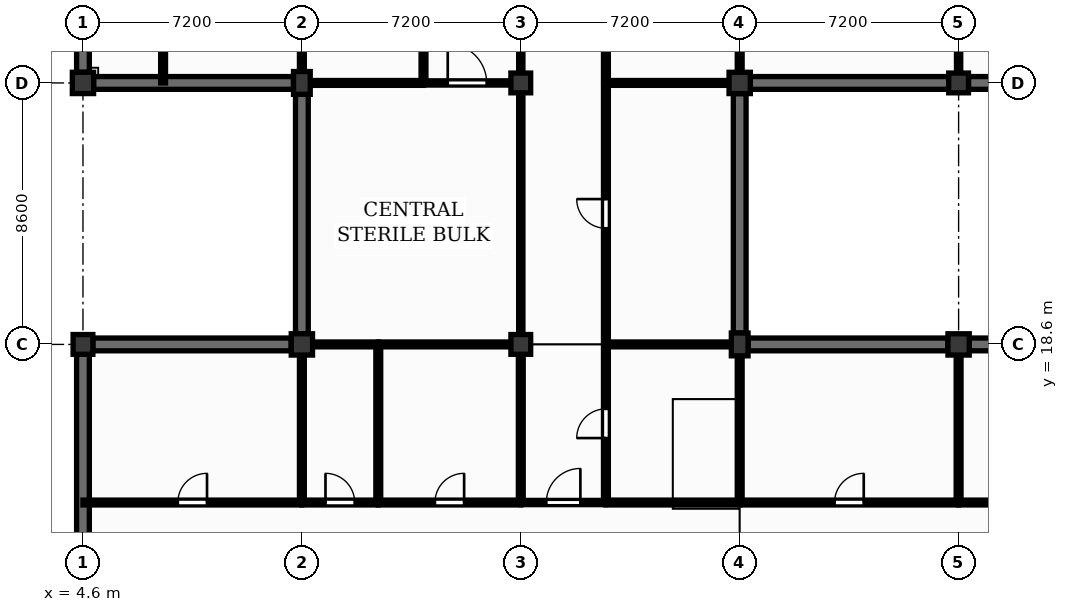
"""IFC4 building model, lengths in metres.
Left out: names, types, materials, properties, quantities, classifications, styles, units other than length and angle.
Written with IfcOpenShell. Run it as: python <this file> out.ifc"""

import sys

from ifc_helpers import new_model, si_unit, direction, frame, frame_2d, origin, origin_2d, place, context, subcontext, project, spatial, rectangle, extrude, element, fill, save


model = new_model("IFC4")
c1 = context("Model", 3, precision=1e-05, world=origin(), true_north=direction((0.0, 1.0)))
c2 = subcontext(c1, "Body", "Model", "MODEL_VIEW")
j1 = project(units=[si_unit("LENGTHUNIT", "METRE"), si_unit("PLANEANGLEUNIT", "RADIAN")], contexts=[c1])
p1 = place(None, origin())
s1 = spatial("IfcSite", under=j1, at=p1, CompositionType="ELEMENT")
p2 = place(p1, origin())
s2 = spatial("IfcBuilding", under=s1, at=p2, CompositionType="ELEMENT")
p3 = place(p2, frame((0.0, 0.0, -4.5)))
s3 = spatial("IfcBuildingStorey", under=s2, at=p3, CompositionType="ELEMENT", Elevation=-4.5)
p4 = place(p3, frame((4.6, 18.6, 0.0), z_axis=(0.0, 0.0, 1.0), x_axis=(1.0, 0.0, 0.0)))
e1 = element("IfcColumn", 1, at=p4, inside=s3, PredefinedType="COLUMN", context=c2, shape_type="SweptSolid", body=[
    extrude(rectangle(XDim=0.65, YDim=0.65, at=origin_2d()), origin(), (0.0, 0.0, 1.0), 4.2),
])
for number, where, z_axis, x_axis in (
    (2, (4.6, 27.2, 0.0), (0.0, 0.0, 1.0), (1.0, 0.0, 0.0)),
    (3, (11.8, 18.6, 0.0), (0.0, 0.0, 1.0), (1.0, 0.0, 0.0)),
):
    element("IfcColumn", number, at=place(p3, frame(where, z_axis=z_axis, x_axis=x_axis)), inside=s3, PredefinedType="COLUMN", context=c2, shape_type="SweptSolid", body=[
        extrude(rectangle(XDim=0.7, YDim=0.7, at=origin_2d()), origin(), (0.0, 0.0, 1.0), 4.2),
    ])
p5 = place(p3, frame((11.8, 27.2, 0.0), z_axis=(0.0, 0.0, 1.0), x_axis=(1.0, 0.0, 0.0)))
e4 = element("IfcColumn", 4, at=p5, inside=s3, PredefinedType="COLUMN", context=c2, shape_type="SweptSolid", body=[
    extrude(rectangle(XDim=0.55, YDim=0.75, at=origin_2d()), origin(), (0.0, 0.0, 1.0), 4.2),
])
for number, where, z_axis, x_axis in (
    (5, (19.0, 18.6, 0.0), (0.0, 0.0, 1.0), (1.0, 0.0, 0.0)),
    (6, (19.0, 27.2, 0.0), (0.0, 0.0, 1.0), (1.0, 0.0, 0.0)),
):
    element("IfcColumn", number, at=place(p3, frame(where, z_axis=z_axis, x_axis=x_axis)), inside=s3, PredefinedType="COLUMN", context=c2, shape_type="SweptSolid", body=[
        extrude(rectangle(XDim=0.65, YDim=0.65, at=origin_2d()), origin(), (0.0, 0.0, 1.0), 4.2),
    ])
p6 = place(p3, frame((26.2, 18.6, 0.0), z_axis=(0.0, 0.0, 1.0), x_axis=(1.0, 0.0, 0.0)))
e7 = element("IfcColumn", 7, at=p6, inside=s3, PredefinedType="COLUMN", context=c2, shape_type="SweptSolid", body=[
    extrude(rectangle(XDim=0.55, YDim=0.75, at=origin_2d()), origin(), (0.0, 0.0, 1.0), 4.2),
])
for number, where, z_axis, x_axis in (
    (8, (26.2, 27.2, 0.0), (0.0, 0.0, 1.0), (1.0, 0.0, 0.0)),
    (9, (33.4, 18.6, 0.0), (0.0, 0.0, 1.0), (1.0, 0.0, 0.0)),
):
    element("IfcColumn", number, at=place(p3, frame(where, z_axis=z_axis, x_axis=x_axis)), inside=s3, PredefinedType="COLUMN", context=c2, shape_type="SweptSolid", body=[
        extrude(rectangle(XDim=0.7, YDim=0.7, at=origin_2d()), origin(), (0.0, 0.0, 1.0), 4.2),
    ])
p7 = place(p3, frame((33.4, 27.2, 0.0), z_axis=(0.0, 0.0, 1.0), x_axis=(1.0, 0.0, 0.0)))
e10 = element("IfcColumn", 10, at=p7, inside=s3, PredefinedType="COLUMN", context=c2, shape_type="SweptSolid", body=[
    extrude(rectangle(XDim=0.65, YDim=0.65, at=origin_2d()), origin(), (0.0, 0.0, 1.0), 4.2),
])
p8 = place(p3, frame((4.925, 18.6, 0.0), z_axis=(0.0, 0.0, 1.0), x_axis=(1.0, 0.0, 0.0)))
e11 = element("IfcWall", 11, at=p8, inside=s3, PredefinedType="USERDEFINED", context=c2, shape_type="SweptSolid", body=[
    extrude(rectangle(XDim=6.525, YDim=0.42, at=frame_2d((3.262, 0.0))), origin(), (0.0, 0.0, 1.0), 4.2),
])
p9 = place(p3, frame((4.6, 11.725, 0.0), z_axis=(0.0, 0.0, 1.0), x_axis=(0.0, 1.0, 0.0)))
e12 = element("IfcWall", 12, at=p9, inside=s3, PredefinedType="USERDEFINED", context=c2, shape_type="SweptSolid", body=[
    extrude(rectangle(XDim=6.55, YDim=0.42, at=frame_2d((3.275, 0.0))), origin(), (0.0, 0.0, 1.0), 4.2),
])
p10 = place(p3, frame((4.95, 27.2, 0.0), z_axis=(0.0, 0.0, 1.0), x_axis=(1.0, 0.0, 0.0)))
e13 = element("IfcWall", 13, at=p10, inside=s3, PredefinedType="USERDEFINED", context=c2, shape_type="SweptSolid", body=[
    extrude(rectangle(XDim=6.575, YDim=0.42, at=frame_2d((3.288, 0.0))), origin(), (0.0, 0.0, 1.0), 4.2),
])
p11 = place(p3, frame((4.6, 27.55, 0.0), z_axis=(0.0, 0.0, 1.0), x_axis=(0.0, 1.0, 0.0)))
e14 = element("IfcWall", 14, at=p11, inside=s3, PredefinedType="USERDEFINED", context=c2, shape_type="SweptSolid", body=[
    extrude(rectangle(XDim=8.925, YDim=0.42, at=frame_2d((4.462, 0.0))), origin(), (0.0, 0.0, 1.0), 4.2),
])
for number, where, z_axis, x_axis in (
    (15, (11.8, 18.95, 0.0), (0.0, 0.0, 1.0), (0.0, 1.0, 0.0)),
    (16, (26.2, 18.975, 0.0), (0.0, 0.0, 1.0), (0.0, 1.0, 0.0)),
):
    element("IfcWall", number, at=place(p3, frame(where, z_axis=z_axis, x_axis=x_axis)), inside=s3, PredefinedType="USERDEFINED", context=c2, shape_type="SweptSolid", body=[
        extrude(rectangle(XDim=7.875, YDim=0.42, at=frame_2d((3.938, 0.0))), origin(), (0.0, 0.0, 1.0), 4.2),
    ])
p12 = place(p3, frame((26.475, 18.6, 0.0), z_axis=(0.0, 0.0, 1.0), x_axis=(1.0, 0.0, 0.0)))
e17 = element("IfcWall", 17, at=p12, inside=s3, PredefinedType="USERDEFINED", context=c2, shape_type="SweptSolid", body=[
    extrude(rectangle(XDim=6.575, YDim=0.42, at=frame_2d((3.288, 0.0))), origin(), (0.0, 0.0, 1.0), 4.2),
])
p13 = place(p3, frame((26.55, 27.2, 0.0), z_axis=(0.0, 0.0, 1.0), x_axis=(1.0, 0.0, 0.0)))
e18 = element("IfcWall", 18, at=p13, inside=s3, PredefinedType="USERDEFINED", context=c2, shape_type="SweptSolid", body=[
    extrude(rectangle(XDim=6.525, YDim=0.42, at=frame_2d((3.262, 0.0))), origin(), (0.0, 0.0, 1.0), 4.2),
])
p14 = place(p3, frame((33.75, 18.6, 0.0), z_axis=(0.0, 0.0, 1.0), x_axis=(1.0, 0.0, 0.0)))
e19 = element("IfcWall", 19, at=p14, inside=s3, PredefinedType="USERDEFINED", context=c2, shape_type="SweptSolid", body=[
    extrude(rectangle(XDim=6.575, YDim=0.42, at=frame_2d((3.288, 0.0))), origin(), (0.0, 0.0, 1.0), 4.2),
])
p15 = place(p3, frame((33.725, 27.2, 0.0), z_axis=(0.0, 0.0, 1.0), x_axis=(1.0, 0.0, 0.0)))
e20 = element("IfcWall", 20, at=p15, inside=s3, PredefinedType="USERDEFINED", context=c2, shape_type="SweptSolid", body=[
    extrude(rectangle(XDim=6.6, YDim=0.42, at=frame_2d((3.3, 0.0))), origin(), (0.0, 0.0, 1.0), 4.2),
])
p16 = place(p3, frame((4.6, 13.4, 0.0), z_axis=(0.0, 0.0, 1.0), x_axis=(1.0, 0.0, 0.0)))
e21 = element("IfcWall", 21, at=p16, inside=s3, PredefinedType="PARTITIONING", context=c2, shape_type="SweptSolid", body=[
    extrude(rectangle(XDim=7.2, YDim=0.16, at=frame_2d((3.6, 0.0))), origin(), (0.0, 0.0, 1.0), 4.08),
])
p17 = place(p16, frame((3.12, 0.0, 0.0)))
e22 = element("IfcOpeningElement", 22, at=p17, cuts=e21, PredefinedType="OPENING", context=c2, shape_type="SweptSolid", body=[
    extrude(rectangle(XDim=0.96, YDim=2.1, at=frame_2d((0.48, 1.05))), frame((0.0, 0.09, 0.0), z_axis=(0.0, -1.0, 0.0), x_axis=(1.0, 0.0, 0.0)), (0.0, 0.0, 1.0), 0.18),
])
p18 = place(p3, frame((7.235, 27.2, 0.0), z_axis=(0.0, 0.0, 1.0), x_axis=(0.0, 1.0, 0.0)))
e23 = element("IfcWall", 23, at=p18, inside=s3, PredefinedType="PARTITIONING", context=c2, shape_type="SweptSolid", body=[
    extrude(rectangle(XDim=8.23, YDim=0.16, at=frame_2d((4.115, 0.0))), origin(), (0.0, 0.0, 1.0), 4.08),
])
p19 = place(p3, frame((11.8, 13.47, 0.0), z_axis=(0.0, 0.0, 1.0), x_axis=(0.0, 1.0, 0.0)))
e24 = element("IfcWall", 24, at=p19, inside=s3, PredefinedType="PARTITIONING", context=c2, shape_type="SweptSolid", body=[
    extrude(rectangle(XDim=4.78, YDim=0.16, at=frame_2d((2.39, 0.0))), origin(), (0.0, 0.0, 1.0), 3.5),
])
p20 = place(p3, frame((11.8, 13.4, 0.0), z_axis=(0.0, 0.0, 1.0), x_axis=(1.0, 0.0, 0.0)))
e25 = element("IfcWall", 25, at=p20, inside=s3, PredefinedType="PARTITIONING", context=c2, shape_type="SweptSolid", body=[
    extrude(rectangle(XDim=2.513, YDim=0.16, at=frame_2d((1.256, 0.0))), origin(), (0.0, 0.0, 1.0), 4.08),
])
p21 = place(p20, frame((0.777, 0.0, 0.0)))
e26 = element("IfcOpeningElement", 26, at=p21, cuts=e25, PredefinedType="OPENING", context=c2, shape_type="SweptSolid", body=[
    extrude(rectangle(XDim=0.96, YDim=2.1, at=frame_2d((0.48, 1.05))), frame((0.0, 0.09, 0.0), z_axis=(0.0, -1.0, 0.0), x_axis=(1.0, 0.0, 0.0)), (0.0, 0.0, 1.0), 0.18),
])
p22 = place(p3, frame((12.15, 18.6, 0.0), z_axis=(0.0, 0.0, 1.0), x_axis=(1.0, 0.0, 0.0)))
e27 = element("IfcWall", 27, at=p22, inside=s3, PredefinedType="PARTITIONING", context=c2, shape_type="SweptSolid", body=[
    extrude(rectangle(XDim=2.163, YDim=0.16, at=frame_2d((1.082, 0.0))), origin(), (0.0, 0.0, 1.0), 3.5),
])
p23 = place(p3, frame((11.8, 27.575, 0.0), z_axis=(0.0, 0.0, 1.0), x_axis=(0.0, 1.0, 0.0)))
e28 = element("IfcWall", 28, at=p23, inside=s3, PredefinedType="PARTITIONING", context=c2, shape_type="SweptSolid", body=[
    extrude(rectangle(XDim=7.855, YDim=0.16, at=frame_2d((3.927, 0.0))), origin(), (0.0, 0.0, 1.0), 3.4),
])
p24 = place(p3, frame((12.075, 27.2, 0.0), z_axis=(0.0, 0.0, 1.0), x_axis=(1.0, 0.0, 0.0)))
e29 = element("IfcWall", 29, at=p24, inside=s3, PredefinedType="PARTITIONING", context=c2, shape_type="SweptSolid", body=[
    extrude(rectangle(XDim=3.725, YDim=0.16, at=frame_2d((1.863, 0.0))), origin(), (0.0, 0.0, 1.0), 3.6),
])
p25 = place(p3, frame((14.313, 13.47, 0.0), z_axis=(0.0, 0.0, 1.0), x_axis=(0.0, 1.0, 0.0)))
e30 = element("IfcWall", 30, at=p25, inside=s3, PredefinedType="PARTITIONING", context=c2, shape_type="SweptSolid", body=[
    extrude(rectangle(XDim=5.06, YDim=0.16, at=frame_2d((2.53, 0.0))), origin(), (0.0, 0.0, 1.0), 4.08),
])
p26 = place(p3, frame((14.313, 13.4, 0.0), z_axis=(0.0, 0.0, 1.0), x_axis=(1.0, 0.0, 0.0)))
e31 = element("IfcWall", 31, at=p26, inside=s3, PredefinedType="PARTITIONING", context=c2, shape_type="SweptSolid", body=[
    extrude(rectangle(XDim=4.687, YDim=0.16, at=frame_2d((2.344, 0.0))), origin(), (0.0, 0.0, 1.0), 4.08),
])
p27 = place(p26, frame((1.864, 0.0, 0.0)))
e32 = element("IfcOpeningElement", 32, at=p27, cuts=e31, PredefinedType="OPENING", context=c2, shape_type="SweptSolid", body=[
    extrude(rectangle(XDim=0.96, YDim=2.1, at=frame_2d((0.48, 1.05))), frame((0.0, 0.09, 0.0), z_axis=(0.0, -1.0, 0.0), x_axis=(1.0, 0.0, 0.0)), (0.0, 0.0, 1.0), 0.18),
])
p28 = place(p3, frame((14.313, 18.6, 0.0), z_axis=(0.0, 0.0, 1.0), x_axis=(1.0, 0.0, 0.0)))
e33 = element("IfcWall", 33, at=p28, inside=s3, PredefinedType="PARTITIONING", context=c2, shape_type="SweptSolid", body=[
    extrude(rectangle(XDim=4.362, YDim=0.16, at=frame_2d((2.181, 0.0))), origin(), (0.0, 0.0, 1.0), 3.5),
])
p29 = place(p3, frame((15.8, 27.27, 0.0), z_axis=(0.0, 0.0, 1.0), x_axis=(0.0, 1.0, 0.0)))
e34 = element("IfcWall", 34, at=p29, inside=s3, PredefinedType="PARTITIONING", context=c2, shape_type="SweptSolid", body=[
    extrude(rectangle(XDim=8.16, YDim=0.16, at=frame_2d((4.08, 0.0))), origin(), (0.0, 0.0, 1.0), 4.08),
])
p30 = place(p3, frame((15.8, 27.2, 0.0), z_axis=(0.0, 0.0, 1.0), x_axis=(1.0, 0.0, 0.0)))
e35 = element("IfcWall", 35, at=p30, inside=s3, PredefinedType="PARTITIONING", context=c2, shape_type="SweptSolid", body=[
    extrude(rectangle(XDim=2.875, YDim=0.14, at=frame_2d((1.438, 0.0))), origin(), (0.0, 0.0, 1.0), 3.6),
])
p31 = place(p30, frame((0.798, 0.0, 0.0)))
e36 = element("IfcOpeningElement", 36, at=p31, cuts=e35, PredefinedType="OPENING", context=c2, shape_type="SweptSolid", body=[
    extrude(rectangle(XDim=1.28, YDim=2.2, at=frame_2d((0.64, 1.1))), frame((0.0, 0.08, 0.0), z_axis=(0.0, -1.0, 0.0), x_axis=(1.0, 0.0, 0.0)), (0.0, 0.0, 1.0), 0.16),
])
p32 = place(p3, frame((19.0, 13.47, 0.0), z_axis=(0.0, 0.0, 1.0), x_axis=(0.0, 1.0, 0.0)))
e37 = element("IfcWall", 37, at=p32, inside=s3, PredefinedType="PARTITIONING", context=c2, shape_type="SweptSolid", body=[
    extrude(rectangle(XDim=4.805, YDim=0.16, at=frame_2d((2.402, 0.0))), origin(), (0.0, 0.0, 1.0), 3.5),
])
p33 = place(p3, frame((19.0, 13.4, 0.0), z_axis=(0.0, 0.0, 1.0), x_axis=(1.0, 0.0, 0.0)))
e38 = element("IfcWall", 38, at=p33, inside=s3, PredefinedType="PARTITIONING", context=c2, shape_type="SweptSolid", body=[
    extrude(rectangle(XDim=2.8, YDim=0.14, at=frame_2d((1.4, 0.0))), origin(), (0.0, 0.0, 1.0), 4.08),
])
p34 = place(p33, frame((0.84, 0.0, 0.0)))
e39 = element("IfcOpeningElement", 39, at=p34, cuts=e38, PredefinedType="OPENING", context=c2, shape_type="SweptSolid", body=[
    extrude(rectangle(XDim=1.12, YDim=2.15, at=frame_2d((0.56, 1.075))), frame((0.0, 0.08, 0.0), z_axis=(0.0, -1.0, 0.0), x_axis=(1.0, 0.0, 0.0)), (0.0, 0.0, 1.0), 0.16),
])
p35 = place(p3, frame((19.0, 18.925, 0.0), z_axis=(0.0, 0.0, 1.0), x_axis=(0.0, 1.0, 0.0)))
e40 = element("IfcWall", 40, at=p35, inside=s3, PredefinedType="PARTITIONING", context=c2, shape_type="SweptSolid", body=[
    extrude(rectangle(XDim=7.95, YDim=0.14, at=frame_2d((3.975, 0.0))), origin(), (0.0, 0.0, 1.0), 3.5),
])
p36 = place(p3, frame((19.0, 27.525, 0.0), z_axis=(0.0, 0.0, 1.0), x_axis=(0.0, 1.0, 0.0)))
e41 = element("IfcWall", 41, at=p36, inside=s3, PredefinedType="PARTITIONING", context=c2, shape_type="SweptSolid", body=[
    extrude(rectangle(XDim=8.925, YDim=0.14, at=frame_2d((4.462, 0.0))), origin(), (0.0, 0.0, 1.0), 3.4),
])
p37 = place(p36, frame((4.012, 0.0, 0.0)))
e42 = element("IfcOpeningElement", 42, at=p37, cuts=e41, PredefinedType="OPENING", context=c2, shape_type="SweptSolid", body=[
    extrude(rectangle(XDim=0.9, YDim=2.1, at=frame_2d((0.45, 1.05))), frame((0.0, 0.08, 0.0), z_axis=(0.0, -1.0, 0.0), x_axis=(1.0, 0.0, 0.0)), (0.0, 0.0, 1.0), 0.16),
])
p38 = place(p3, frame((21.8, 13.47, 0.0), z_axis=(0.0, 0.0, 1.0), x_axis=(0.0, 1.0, 0.0)))
e43 = element("IfcWall", 43, at=p38, inside=s3, PredefinedType="PARTITIONING", context=c2, shape_type="SweptSolid", body=[
    extrude(rectangle(XDim=5.06, YDim=0.16, at=frame_2d((2.53, 0.0))), origin(), (0.0, 0.0, 1.0), 4.08),
])
p39 = place(p38, frame((2.05, 0.0, 0.0)))
e44 = element("IfcOpeningElement", 44, at=p39, cuts=e43, PredefinedType="OPENING", context=c2, shape_type="SweptSolid", body=[
    extrude(rectangle(XDim=0.96, YDim=2.1, at=frame_2d((0.48, 1.05))), frame((0.0, 0.09, 0.0), z_axis=(0.0, -1.0, 0.0), x_axis=(1.0, 0.0, 0.0)), (0.0, 0.0, 1.0), 0.18),
])
p40 = place(p3, frame((21.8, 13.4, 0.0), z_axis=(0.0, 0.0, 1.0), x_axis=(1.0, 0.0, 0.0)))
e45 = element("IfcWall", 45, at=p40, inside=s3, PredefinedType="PARTITIONING", context=c2, shape_type="SweptSolid", body=[
    extrude(rectangle(XDim=4.4, YDim=0.16, at=frame_2d((2.2, 0.0))), origin(), (0.0, 0.0, 1.0), 4.08),
])
p41 = place(p3, frame((21.8, 18.67, 0.0), z_axis=(0.0, 0.0, 1.0), x_axis=(0.0, 1.0, 0.0)))
e46 = element("IfcWall", 46, at=p41, inside=s3, PredefinedType="PARTITIONING", context=c2, shape_type="SweptSolid", body=[
    extrude(rectangle(XDim=8.46, YDim=0.16, at=frame_2d((4.23, 0.0))), origin(), (0.0, 0.0, 1.0), 4.08),
])
p42 = place(p41, frame((3.75, 0.0, 0.0)))
e47 = element("IfcOpeningElement", 47, at=p42, cuts=e46, PredefinedType="OPENING", context=c2, shape_type="SweptSolid", body=[
    extrude(rectangle(XDim=0.96, YDim=2.1, at=frame_2d((0.48, 1.05))), frame((0.0, 0.09, 0.0), z_axis=(0.0, -1.0, 0.0), x_axis=(1.0, 0.0, 0.0)), (0.0, 0.0, 1.0), 0.18),
])
p43 = place(p3, frame((21.8, 18.6, 0.0), z_axis=(0.0, 0.0, 1.0), x_axis=(1.0, 0.0, 0.0)))
e48 = element("IfcWall", 48, at=p43, inside=s3, PredefinedType="PARTITIONING", context=c2, shape_type="SweptSolid", body=[
    extrude(rectangle(XDim=4.125, YDim=0.16, at=frame_2d((2.062, 0.0))), origin(), (0.0, 0.0, 1.0), 3.5),
])
p44 = place(p3, frame((21.8, 27.27, 0.0), z_axis=(0.0, 0.0, 1.0), x_axis=(0.0, 1.0, 0.0)))
e49 = element("IfcWall", 49, at=p44, inside=s3, PredefinedType="PARTITIONING", context=c2, shape_type="SweptSolid", body=[
    extrude(rectangle(XDim=3.06, YDim=0.16, at=frame_2d((1.53, 0.0))), origin(), (0.0, 0.0, 1.0), 4.08),
])
p45 = place(p44, frame((1.05, 0.0, 0.0)))
e50 = element("IfcOpeningElement", 50, at=p45, cuts=e49, PredefinedType="OPENING", context=c2, shape_type="SweptSolid", body=[
    extrude(rectangle(XDim=0.96, YDim=2.1, at=frame_2d((0.48, 1.05))), frame((0.0, 0.09, 0.0), z_axis=(0.0, -1.0, 0.0), x_axis=(1.0, 0.0, 0.0)), (0.0, 0.0, 1.0), 0.18),
])
p46 = place(p3, frame((21.8, 27.2, 0.0), z_axis=(0.0, 0.0, 1.0), x_axis=(1.0, 0.0, 0.0)))
e51 = element("IfcWall", 51, at=p46, inside=s3, PredefinedType="PARTITIONING", context=c2, shape_type="SweptSolid", body=[
    extrude(rectangle(XDim=4.05, YDim=0.16, at=frame_2d((2.025, 0.0))), origin(), (0.0, 0.0, 1.0), 3.6),
])
p47 = place(p3, frame((26.2, 13.47, 0.0), z_axis=(0.0, 0.0, 1.0), x_axis=(0.0, 1.0, 0.0)))
e52 = element("IfcWall", 52, at=p47, inside=s3, PredefinedType="PARTITIONING", context=c2, shape_type="SweptSolid", body=[
    extrude(rectangle(XDim=4.755, YDim=0.16, at=frame_2d((2.377, 0.0))), origin(), (0.0, 0.0, 1.0), 3.5),
])
p48 = place(p3, frame((26.2, 13.4, 0.0), z_axis=(0.0, 0.0, 1.0), x_axis=(1.0, 0.0, 0.0)))
e53 = element("IfcWall", 53, at=p48, inside=s3, PredefinedType="PARTITIONING", context=c2, shape_type="SweptSolid", body=[
    extrude(rectangle(XDim=7.2, YDim=0.16, at=frame_2d((3.6, 0.0))), origin(), (0.0, 0.0, 1.0), 4.08),
])
p49 = place(p48, frame((3.12, 0.0, 0.0)))
e54 = element("IfcOpeningElement", 54, at=p49, cuts=e53, PredefinedType="OPENING", context=c2, shape_type="SweptSolid", body=[
    extrude(rectangle(XDim=0.96, YDim=2.1, at=frame_2d((0.48, 1.05))), frame((0.0, 0.09, 0.0), z_axis=(0.0, -1.0, 0.0), x_axis=(1.0, 0.0, 0.0)), (0.0, 0.0, 1.0), 0.18),
])
p50 = place(p3, frame((26.2, 27.55, 0.0), z_axis=(0.0, 0.0, 1.0), x_axis=(0.0, 1.0, 0.0)))
e55 = element("IfcWall", 55, at=p50, inside=s3, PredefinedType="PARTITIONING", context=c2, shape_type="SweptSolid", body=[
    extrude(rectangle(XDim=2.78, YDim=0.16, at=frame_2d((1.39, 0.0))), origin(), (0.0, 0.0, 1.0), 3.4),
])
p51 = place(p3, frame((33.4, 13.47, 0.0), z_axis=(0.0, 0.0, 1.0), x_axis=(0.0, 1.0, 0.0)))
e56 = element("IfcWall", 56, at=p51, inside=s3, PredefinedType="PARTITIONING", context=c2, shape_type="SweptSolid", body=[
    extrude(rectangle(XDim=4.78, YDim=0.16, at=frame_2d((2.39, 0.0))), origin(), (0.0, 0.0, 1.0), 3.5),
])
p52 = place(p3, frame((33.4, 13.4, 0.0), z_axis=(0.0, 0.0, 1.0), x_axis=(1.0, 0.0, 0.0)))
e57 = element("IfcWall", 57, at=p52, inside=s3, PredefinedType="PARTITIONING", context=c2, shape_type="SweptSolid", body=[
    extrude(rectangle(XDim=7.2, YDim=0.16, at=frame_2d((3.6, 0.0))), origin(), (0.0, 0.0, 1.0), 4.08),
])
p53 = place(p52, frame((3.12, 0.0, 0.0)))
e58 = element("IfcOpeningElement", 58, at=p53, cuts=e57, PredefinedType="OPENING", context=c2, shape_type="SweptSolid", body=[
    extrude(rectangle(XDim=0.96, YDim=2.1, at=frame_2d((0.48, 1.05))), frame((0.0, 0.09, 0.0), z_axis=(0.0, -1.0, 0.0), x_axis=(1.0, 0.0, 0.0)), (0.0, 0.0, 1.0), 0.18),
])
p54 = place(p3, frame((33.4, 27.525, 0.0), z_axis=(0.0, 0.0, 1.0), x_axis=(0.0, 1.0, 0.0)))
e59 = element("IfcWall", 59, at=p54, inside=s3, PredefinedType="PARTITIONING", context=c2, shape_type="SweptSolid", body=[
    extrude(rectangle(XDim=2.805, YDim=0.14, at=frame_2d((1.403, 0.0))), origin(), (0.0, 0.0, 1.0), 3.4),
])
p55 = place(p34, origin())
e60 = element("IfcDoor", 60, at=p55, inside=s3, OperationType="SINGLE_SWING_RIGHT", PredefinedType="DOOR", context=c2, shape_type="SweptSolid", body=[
    extrude(rectangle(XDim=1.12, YDim=2.15, at=frame_2d((0.56, 1.075))), frame((0.0, 0.025, 0.0), z_axis=(0.0, -1.0, 0.0), x_axis=(1.0, 0.0, 0.0)), (0.0, 0.0, 1.0), 0.05),
])
fill(e39, e60)
p56 = place(p31, origin())
e61 = element("IfcDoor", 61, at=p56, inside=s3, OperationType="SINGLE_SWING_LEFT", PredefinedType="DOOR", context=c2, shape_type="SweptSolid", body=[
    extrude(rectangle(XDim=1.28, YDim=2.2, at=frame_2d((0.64, 1.1))), frame((0.0, 0.025, 0.0), z_axis=(0.0, -1.0, 0.0), x_axis=(1.0, 0.0, 0.0)), (0.0, 0.0, 1.0), 0.05),
])
fill(e36, e61)
p57 = place(p42, origin())
e62 = element("IfcDoor", 62, at=p57, inside=s3, OperationType="SINGLE_SWING_RIGHT", PredefinedType="DOOR", context=c2, shape_type="SweptSolid", body=[
    extrude(rectangle(XDim=0.96, YDim=2.1, at=frame_2d((0.48, 1.05))), frame((0.0, 0.025, 0.0), z_axis=(0.0, -1.0, 0.0), x_axis=(1.0, 0.0, 0.0)), (0.0, 0.0, 1.0), 0.05),
])
fill(e47, e62)
p58 = place(p17, origin())
e63 = element("IfcDoor", 63, at=p58, inside=s3, OperationType="SINGLE_SWING_RIGHT", PredefinedType="DOOR", context=c2, shape_type="SweptSolid", body=[
    extrude(rectangle(XDim=0.96, YDim=2.1, at=frame_2d((0.48, 1.05))), frame((0.0, 0.025, 0.0), z_axis=(0.0, -1.0, 0.0), x_axis=(1.0, 0.0, 0.0)), (0.0, 0.0, 1.0), 0.05),
])
fill(e22, e63)
p59 = place(p21, origin())
e64 = element("IfcDoor", 64, at=p59, inside=s3, OperationType="SINGLE_SWING_LEFT", PredefinedType="DOOR", context=c2, shape_type="SweptSolid", body=[
    extrude(rectangle(XDim=0.96, YDim=2.1, at=frame_2d((0.48, 1.05))), frame((0.0, 0.025, 0.0), z_axis=(0.0, -1.0, 0.0), x_axis=(1.0, 0.0, 0.0)), (0.0, 0.0, 1.0), 0.05),
])
fill(e26, e64)
p60 = place(p27, origin())
e65 = element("IfcDoor", 65, at=p60, inside=s3, OperationType="SINGLE_SWING_RIGHT", PredefinedType="DOOR", context=c2, shape_type="SweptSolid", body=[
    extrude(rectangle(XDim=0.96, YDim=2.1, at=frame_2d((0.48, 1.05))), frame((0.0, 0.025, 0.0), z_axis=(0.0, -1.0, 0.0), x_axis=(1.0, 0.0, 0.0)), (0.0, 0.0, 1.0), 0.05),
])
fill(e32, e65)
p61 = place(p39, origin())
e66 = element("IfcDoor", 66, at=p61, inside=s3, OperationType="SINGLE_SWING_LEFT", PredefinedType="DOOR", context=c2, shape_type="SweptSolid", body=[
    extrude(rectangle(XDim=0.96, YDim=2.1, at=frame_2d((0.48, 1.05))), frame((0.0, 0.025, 0.0), z_axis=(0.0, -1.0, 0.0), x_axis=(1.0, 0.0, 0.0)), (0.0, 0.0, 1.0), 0.05),
])
fill(e44, e66)
p62 = place(p49, origin())
e67 = element("IfcDoor", 67, at=p62, inside=s3, OperationType="SINGLE_SWING_RIGHT", PredefinedType="DOOR", context=c2, shape_type="SweptSolid", body=[
    extrude(rectangle(XDim=0.96, YDim=2.1, at=frame_2d((0.48, 1.05))), frame((0.0, 0.025, 0.0), z_axis=(0.0, -1.0, 0.0), x_axis=(1.0, 0.0, 0.0)), (0.0, 0.0, 1.0), 0.05),
])
fill(e54, e67)
save(model, sys.argv[1])
